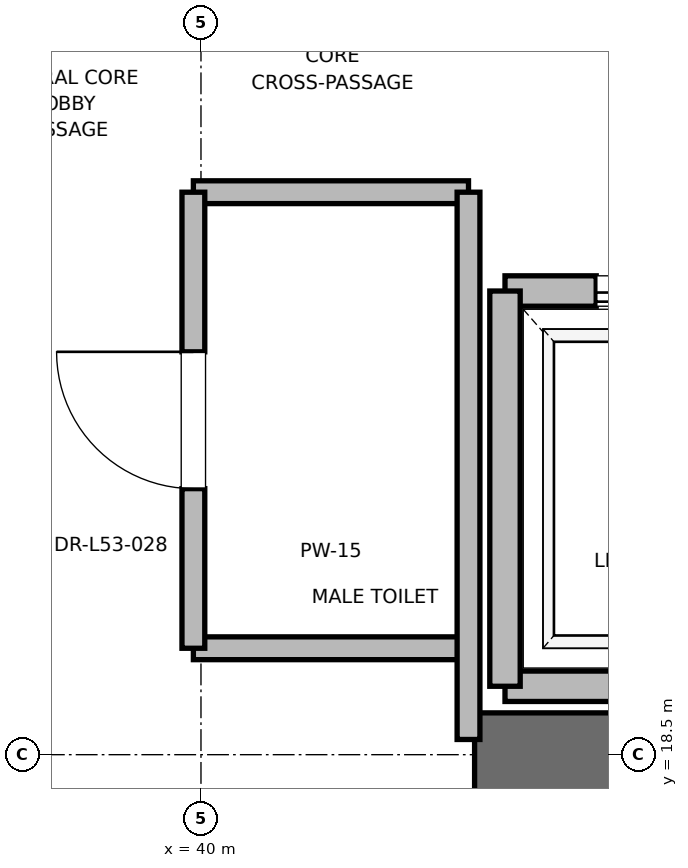
"""IFC4 building model, lengths in metres.
Left out: names, types, materials, properties, quantities, classifications, styles, units other than length and angle.
Written with IfcOpenShell. Run it as: python <this file> out.ifc"""

import sys

from ifc_helpers import new_model, si_unit, direction, frame, frame_2d, origin, place, context, subcontext, project, spatial, rectangle, extrude, element, fill, save


model = new_model("IFC4")
c1 = context("Model", 3, precision=1e-05, world=origin(), true_north=direction((0.0, 1.0)))
c2 = subcontext(c1, "Body", "Model", "MODEL_VIEW")
j1 = project(units=[si_unit("LENGTHUNIT", "METRE"), si_unit("PLANEANGLEUNIT", "RADIAN")], contexts=[c1])
p1 = place(None, origin())
s1 = spatial("IfcSite", under=j1, at=p1, CompositionType="ELEMENT")
p2 = place(p1, origin())
s2 = spatial("IfcBuilding", under=s1, at=p2, CompositionType="ELEMENT")
p3 = place(p2, frame((0.0, 0.0, 229.2)))
s3 = spatial("IfcBuildingStorey", under=s2, at=p3, CompositionType="ELEMENT", Elevation=229.2)
p4 = place(p3, frame((41.8, 18.5, 0.0), z_axis=(0.0, 0.0, 1.0), x_axis=(1.0, 0.0, 0.0)))
e1 = element("IfcWall", 1, at=p4, inside=s3, PredefinedType="SHEAR", context=c2, shape_type="SweptSolid", body=[
    extrude(rectangle(XDim=9.2, YDim=0.55, at=frame_2d((4.6, 0.0))), origin(), (0.0, 0.0, 1.0), 3.7),
])
p5 = place(p3, frame((42.0, 18.95, 0.0), z_axis=(0.0, 0.0, 1.0), x_axis=(1.0, 0.0, 0.0)))
e2 = element("IfcWall", 2, at=p5, inside=s3, PredefinedType="SOLIDWALL", context=c2, shape_type="SweptSolid", body=[
    extrude(rectangle(XDim=2.3, YDim=0.2, at=frame_2d((1.15, 0.0))), origin(), (0.0, 0.0, 1.0), 2.68),
])
p6 = place(p3, frame((44.3, 21.55, 0.0), z_axis=(0.0, 0.0, 1.0), x_axis=(-1.0, 0.0, 0.0)))
e3 = element("IfcWall", 3, at=p6, inside=s3, PredefinedType="SOLIDWALL", context=c2, shape_type="SweptSolid", body=[
    extrude(rectangle(XDim=2.3, YDim=0.2, at=frame_2d((1.15, 0.0))), origin(), (0.0, 0.0, 1.0), 3.7),
])
p7 = place(p6, frame((0.6, 0.0, 0.0)))
e4 = element("IfcOpeningElement", 4, at=p7, cuts=e3, PredefinedType="OPENING", context=c2, shape_type="SweptSolid", body=[
    extrude(rectangle(XDim=1.1, YDim=2.2, at=frame_2d((0.55, 1.1))), frame((0.0, 0.1, 0.0), z_axis=(0.0, -1.0, 0.0), x_axis=(1.0, 0.0, 0.0)), (0.0, 0.0, 1.0), 0.2),
])
p8 = place(p3, frame((42.0, 21.55, 0.0), z_axis=(0.0, 0.0, 1.0), x_axis=(0.0, -1.0, 0.0)))
e5 = element("IfcWall", 5, at=p8, inside=s3, PredefinedType="SOLIDWALL", context=c2, shape_type="SweptSolid", body=[
    extrude(rectangle(XDim=2.6, YDim=0.2, at=frame_2d((1.3, 0.0))), origin(), (0.0, 0.0, 1.0), 2.68),
])
for number, where, z_axis, x_axis in (
    (6, (39.95, 19.2, 0.0), (0.0, 0.0, 1.0), (1.0, 0.0, 0.0)),
    (7, (39.95, 22.2, 0.0), (0.0, 0.0, 1.0), (1.0, 0.0, 0.0)),
):
    element("IfcWall", number, at=place(p3, frame(where, z_axis=z_axis, x_axis=x_axis)), inside=s3, PredefinedType="PARTITIONING", context=c2, shape_type="SweptSolid", body=[
        extrude(rectangle(XDim=1.81, YDim=0.15, at=frame_2d((0.905, 0.0))), origin(), (0.0, 0.0, 1.0), 2.85),
    ])
p9 = place(p3, frame((41.76, 18.6, 0.0), z_axis=(0.0, 0.0, 1.0), x_axis=(0.0, 1.0, 0.0)))
e8 = element("IfcWall", 8, at=p9, inside=s3, PredefinedType="PARTITIONING", context=c2, shape_type="SweptSolid", body=[
    extrude(rectangle(XDim=3.6, YDim=0.15, at=frame_2d((1.8, 0.0))), origin(), (0.0, 0.0, 1.0), 2.68),
])
p10 = place(p3, frame((39.95, 19.2, 0.0), z_axis=(0.0, 0.0, 1.0), x_axis=(0.0, 1.0, 0.0)))
e9 = element("IfcWall", 9, at=p10, inside=s3, PredefinedType="PARTITIONING", context=c2, shape_type="SweptSolid", body=[
    extrude(rectangle(XDim=3.0, YDim=0.15, at=frame_2d((1.5, 0.0))), origin(), (0.0, 0.0, 1.0), 2.85),
])
p11 = place(p10, frame((1.05, 0.0, 0.0)))
e10 = element("IfcOpeningElement", 10, at=p11, cuts=e9, PredefinedType="OPENING", context=c2, shape_type="SweptSolid", body=[
    extrude(rectangle(XDim=0.9, YDim=2.1, at=frame_2d((0.45, 1.05))), frame((0.0, 0.075, 0.0), z_axis=(0.0, -1.0, 0.0), x_axis=(1.0, 0.0, 0.0)), (0.0, 0.0, 1.0), 0.15),
])
p12 = place(p7, origin())
e11 = element("IfcDoor", 11, at=p12, inside=s3, OperationType="SLIDING_TO_RIGHT", PredefinedType="DOOR", context=c2, shape_type="SweptSolid", body=[
    extrude(rectangle(XDim=1.1, YDim=2.2, at=frame_2d((0.55, 1.1))), frame((0.0, 0.025, 0.0), z_axis=(0.0, -1.0, 0.0), x_axis=(1.0, 0.0, 0.0)), (0.0, 0.0, 1.0), 0.05),
])
fill(e4, e11)
p13 = place(p11, origin())
e12 = element("IfcDoor", 12, at=p13, inside=s3, OperationType="SINGLE_SWING_RIGHT", PredefinedType="DOOR", context=c2, shape_type="SweptSolid", body=[
    extrude(rectangle(XDim=0.9, YDim=2.1, at=frame_2d((0.45, 1.05))), frame((0.0, 0.025, 0.0), z_axis=(0.0, -1.0, 0.0), x_axis=(1.0, 0.0, 0.0)), (0.0, 0.0, 1.0), 0.05),
])
fill(e10, e12)
save(model, sys.argv[1])
